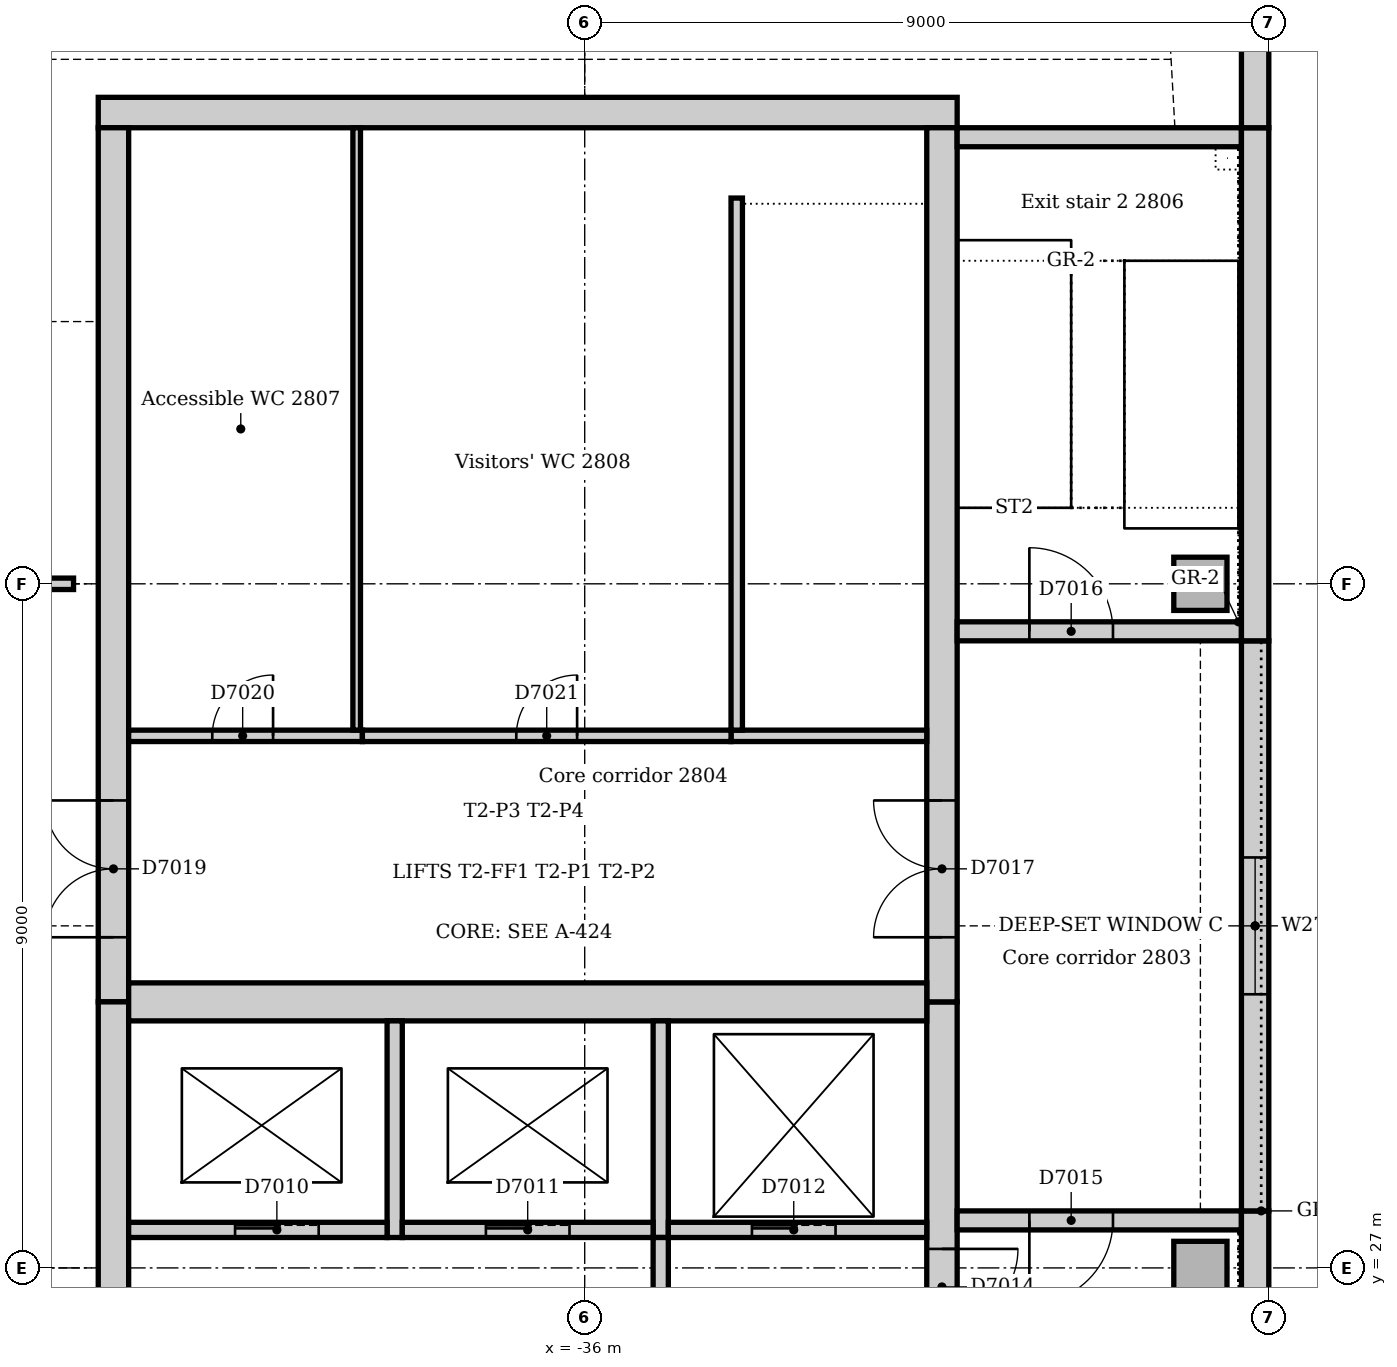
"""IFC4 building model, lengths in metres.
Left out: names, types, materials, properties, quantities, classifications, styles, units other than length and angle.
Written with IfcOpenShell. Run it as: python <this file> out.ifc"""

import sys

from ifc_helpers import new_model, si_unit, direction, frame, frame_2d, origin, origin_2d, place, context, subcontext, project, spatial, rectangle, extrude, element, fill, save


model = new_model("IFC4")
c1 = context("Model", 3, precision=1e-05, world=origin(), true_north=direction((0.0, 1.0)))
c2 = subcontext(c1, "Body", "Model", "MODEL_VIEW")
j1 = project(units=[si_unit("LENGTHUNIT", "METRE"), si_unit("PLANEANGLEUNIT", "RADIAN")], contexts=[c1])
p1 = place(None, origin())
s1 = spatial("IfcSite", under=j1, at=p1, CompositionType="ELEMENT")
p2 = place(p1, origin())
s2 = spatial("IfcBuilding", under=s1, at=p2, CompositionType="ELEMENT")
p3 = place(p2, frame((0.0, 0.0, 120.0)))
s3 = spatial("IfcBuildingStorey", under=s2, at=p3, CompositionType="ELEMENT", Elevation=120.0)
p4 = place(p3, frame((-31.1, 42.2, 0.0), z_axis=(0.0, 0.0, 1.0), x_axis=(-1.0, 0.0, 0.0)))
e1 = element("IfcWall", 1, at=p4, inside=s3, PredefinedType="SOLIDWALL", context=c2, shape_type="SweptSolid", body=[
    extrude(rectangle(XDim=11.3, YDim=0.4, at=frame_2d((5.65, 0.0))), origin(), (0.0, 0.0, 1.0), 4.0),
])
p5 = place(p3, frame((-31.3, 21.0, 0.0), z_axis=(0.0, 0.0, 1.0), x_axis=(0.0, 1.0, 0.0)))
e2 = element("IfcWall", 2, at=p5, inside=s3, PredefinedType="SOLIDWALL", context=c2, shape_type="SweptSolid", body=[
    extrude(rectangle(XDim=9.5, YDim=0.4, at=frame_2d((4.75, 0.0))), origin(), (0.0, 0.0, 1.0), 4.0),
])
p6 = place(p5, frame((5.25, 0.0, 0.0)))
e3 = element("IfcOpeningElement", 3, at=p6, cuts=e2, PredefinedType="OPENING", context=c2, shape_type="SweptSolid", body=[
    extrude(rectangle(XDim=1.0, YDim=2.1, at=frame_2d((0.5, 1.05))), frame((0.0, 0.21, 0.0), z_axis=(0.0, -1.0, 0.0), x_axis=(1.0, 0.0, 0.0)), (0.0, 0.0, 1.0), 0.42),
])
p7 = place(p3, frame((-31.3, 30.5, 0.0), z_axis=(0.0, 0.0, 1.0), x_axis=(0.0, 1.0, 0.0)))
e4 = element("IfcWall", 4, at=p7, inside=s3, PredefinedType="SOLIDWALL", context=c2, shape_type="SweptSolid", body=[
    extrude(rectangle(XDim=11.5, YDim=0.4, at=frame_2d((5.75, 0.0))), origin(), (0.0, 0.0, 1.0), 4.0),
])
p8 = place(p7, frame((0.85, 0.0, 0.0)))
e5 = element("IfcOpeningElement", 5, at=p8, cuts=e4, PredefinedType="OPENING", context=c2, shape_type="SweptSolid", body=[
    extrude(rectangle(XDim=1.8, YDim=2.1, at=frame_2d((0.9, 1.05))), frame((0.0, 0.21, 0.0), z_axis=(0.0, -1.0, 0.0), x_axis=(1.0, 0.0, 0.0)), (0.0, 0.0, 1.0), 0.42),
])
p9 = place(p3, frame((-42.2, 42.0, 0.0), z_axis=(0.0, 0.0, 1.0), x_axis=(0.0, -1.0, 0.0)))
e6 = element("IfcWall", 6, at=p9, inside=s3, PredefinedType="SOLIDWALL", context=c2, shape_type="SweptSolid", body=[
    extrude(rectangle(XDim=11.5, YDim=0.4, at=frame_2d((5.75, 0.0))), origin(), (0.0, 0.0, 1.0), 4.0),
])
p10 = place(p9, frame((8.85, 0.0, 0.0)))
e7 = element("IfcOpeningElement", 7, at=p10, cuts=e6, PredefinedType="OPENING", context=c2, shape_type="SweptSolid", body=[
    extrude(rectangle(XDim=1.8, YDim=2.1, at=frame_2d((0.9, 1.05))), frame((0.0, 0.21, 0.0), z_axis=(0.0, -1.0, 0.0), x_axis=(1.0, 0.0, 0.0)), (0.0, 0.0, 1.0), 0.42),
])
p11 = place(p3, frame((-42.2, 30.5, 0.0), z_axis=(0.0, 0.0, 1.0), x_axis=(0.0, -1.0, 0.0)))
e8 = element("IfcWall", 8, at=p11, inside=s3, PredefinedType="SOLIDWALL", context=c2, shape_type="SweptSolid", body=[
    extrude(rectangle(XDim=9.5, YDim=0.4, at=frame_2d((4.75, 0.0))), origin(), (0.0, 0.0, 1.0), 4.0),
])
p12 = place(p11, frame((3.85, 0.0, 0.0)))
e9 = element("IfcOpeningElement", 9, at=p12, cuts=e8, PredefinedType="OPENING", context=c2, shape_type="SweptSolid", body=[
    extrude(rectangle(XDim=1.8, YDim=2.1, at=frame_2d((0.9, 1.05))), frame((0.0, 0.21, 0.0), z_axis=(0.0, -1.0, 0.0), x_axis=(1.0, 0.0, 0.0)), (0.0, 0.0, 1.0), 0.42),
])
p13 = place(p3, frame((-42.0, 30.5, 0.0), z_axis=(0.0, 0.0, 1.0), x_axis=(1.0, 0.0, 0.0)))
e10 = element("IfcWall", 10, at=p13, inside=s3, PredefinedType="SOLIDWALL", context=c2, shape_type="SweptSolid", body=[
    extrude(rectangle(XDim=10.5, YDim=0.5, at=frame_2d((5.25, 0.0))), origin(), (0.0, 0.0, 1.0), 4.0),
])
p14 = place(p3, frame((-27.36, 27.625, 0.0), z_axis=(0.0, 0.0, 1.0), x_axis=(-1.0, 0.0, 0.0)))
e11 = element("IfcWall", 11, at=p14, inside=s3, PredefinedType="SOLIDWALL", context=c2, shape_type="SweptSolid", body=[
    extrude(rectangle(XDim=3.74, YDim=0.25, at=frame_2d((1.87, 0.0))), origin(), (0.0, 0.0, 1.0), 4.0),
])
p15 = place(p14, frame((1.69, 0.0, 0.0)))
e12 = element("IfcOpeningElement", 12, at=p15, cuts=e11, PredefinedType="OPENING", context=c2, shape_type="SweptSolid", body=[
    extrude(rectangle(XDim=1.1, YDim=2.1, at=frame_2d((0.55, 1.05))), frame((0.0, 0.135, 0.0), z_axis=(0.0, -1.0, 0.0), x_axis=(1.0, 0.0, 0.0)), (0.0, 0.0, 1.0), 0.27),
])
p16 = place(p3, frame((-31.1, 35.375, 0.0), z_axis=(0.0, 0.0, 1.0), x_axis=(1.0, 0.0, 0.0)))
e13 = element("IfcWall", 13, at=p16, inside=s3, PredefinedType="SOLIDWALL", context=c2, shape_type="SweptSolid", body=[
    extrude(rectangle(XDim=3.74, YDim=0.25, at=frame_2d((1.87, 0.0))), origin(), (0.0, 0.0, 1.0), 4.0),
])
p17 = place(p16, frame((0.95, 0.0, 0.0)))
e14 = element("IfcOpeningElement", 14, at=p17, cuts=e13, PredefinedType="OPENING", context=c2, shape_type="SweptSolid", body=[
    extrude(rectangle(XDim=1.1, YDim=2.1, at=frame_2d((0.55, 1.05))), frame((0.0, 0.135, 0.0), z_axis=(0.0, -1.0, 0.0), x_axis=(1.0, 0.0, 0.0)), (0.0, 0.0, 1.0), 0.27),
])
p18 = place(p3, frame((-27.36, 41.875, 0.0), z_axis=(0.0, 0.0, 1.0), x_axis=(-1.0, 0.0, 0.0)))
e15 = element("IfcWall", 15, at=p18, inside=s3, PredefinedType="SOLIDWALL", context=c2, shape_type="SweptSolid", body=[
    extrude(rectangle(XDim=3.74, YDim=0.25, at=frame_2d((1.87, 0.0))), origin(), (0.0, 0.0, 1.0), 4.0),
])
for number, where, z_axis, x_axis in (
    (16, (-27.9, 27.0, 0.0), (0.0, 0.0, 1.0), (1.0, 0.0, 0.0)),
    (17, (-27.9, 36.0, 0.0), (0.0, 0.0, 1.0), (1.0, 0.0, 0.0)),
):
    element("IfcColumn", number, at=place(p3, frame(where, z_axis=z_axis, x_axis=x_axis)), inside=s3, PredefinedType="COLUMN", context=c2, shape_type="SweptSolid", body=[
        extrude(rectangle(XDim=0.7, YDim=0.7, at=origin_2d()), origin(), (0.0, 0.0, 1.0), 4.0),
    ])
p19 = place(p3, frame((-27.18, 21.0, 0.0), z_axis=(0.0, 0.0, 1.0), x_axis=(0.0, 1.0, 0.0)))
e18 = element("IfcWall", 18, at=p19, inside=s3, PredefinedType="STANDARD", context=c2, shape_type="SweptSolid", body=[
    extrude(rectangle(XDim=6.75, YDim=0.36, at=frame_2d((3.375, 0.0))), origin(), (0.0, 0.0, 1.0), 3.85),
])
p20 = place(p3, frame((-27.18, 27.75, 0.0), z_axis=(0.0, 0.0, 1.0), x_axis=(0.0, 1.0, 0.0)))
e19 = element("IfcWall", 19, at=p20, inside=s3, PredefinedType="STANDARD", context=c2, shape_type="SweptSolid", body=[
    extrude(rectangle(XDim=7.5, YDim=0.36, at=frame_2d((3.75, 0.0))), origin(), (0.0, 0.0, 1.0), 3.85),
])
p21 = place(p20, frame((2.85, 0.0, 1.2)))
e20 = element("IfcOpeningElement", 20, at=p21, cuts=e19, PredefinedType="OPENING", context=c2, shape_type="SweptSolid", body=[
    extrude(rectangle(XDim=1.8, YDim=1.2, at=frame_2d((0.9, 0.6))), frame((0.0, 0.19, 0.0), z_axis=(0.0, -1.0, 0.0), x_axis=(1.0, 0.0, 0.0)), (0.0, 0.0, 1.0), 0.38),
])
p22 = place(p3, frame((-27.18, 35.25, 0.0), z_axis=(0.0, 0.0, 1.0), x_axis=(0.0, 1.0, 0.0)))
e21 = element("IfcWall", 21, at=p22, inside=s3, PredefinedType="STANDARD", context=c2, shape_type="SweptSolid", body=[
    extrude(rectangle(XDim=6.75, YDim=0.36, at=frame_2d((3.375, 0.0))), origin(), (0.0, 0.0, 1.0), 3.85),
])
p23 = place(p3, frame((-27.18, 42.0, 0.0), z_axis=(0.0, 0.0, 1.0), x_axis=(0.0, 1.0, 0.0)))
e22 = element("IfcWall", 22, at=p23, inside=s3, PredefinedType="STANDARD", context=c2, shape_type="SweptSolid", body=[
    extrude(rectangle(XDim=3.257, YDim=0.36, at=frame_2d((1.629, 0.0))), origin(), (0.0, 0.0, 1.0), 3.85),
])
p24 = place(p3, frame((-38.5, 27.4, 0.0), z_axis=(0.0, 0.0, 1.0), x_axis=(0.0, 1.0, 0.0)))
e23 = element("IfcWall", 23, at=p24, inside=s3, PredefinedType="SOLIDWALL", context=c2, shape_type="SweptSolid", body=[
    extrude(rectangle(XDim=2.85, YDim=0.2, at=frame_2d((1.425, 0.0))), origin(), (0.0, 0.0, 1.0), 4.0),
])
p25 = place(p3, frame((-42.0, 27.5, 0.0), z_axis=(0.0, 0.0, 1.0), x_axis=(1.0, 0.0, 0.0)))
e24 = element("IfcWall", 24, at=p25, inside=s3, PredefinedType="SOLIDWALL", context=c2, shape_type="SweptSolid", body=[
    extrude(rectangle(XDim=3.4, YDim=0.2, at=frame_2d((1.7, 0.0))), origin(), (0.0, 0.0, 1.0), 4.0),
])
p26 = place(p25, frame((1.4, 0.0, 0.0)))
e25 = element("IfcOpeningElement", 25, at=p26, cuts=e24, PredefinedType="OPENING", context=c2, shape_type="SweptSolid", body=[
    extrude(rectangle(XDim=1.1, YDim=2.1, at=frame_2d((0.55, 1.05))), frame((0.0, 0.11, 0.0), z_axis=(0.0, -1.0, 0.0), x_axis=(1.0, 0.0, 0.0)), (0.0, 0.0, 1.0), 0.22),
])
p27 = place(p3, frame((-35.0, 27.4, 0.0), z_axis=(0.0, 0.0, 1.0), x_axis=(0.0, 1.0, 0.0)))
e26 = element("IfcWall", 26, at=p27, inside=s3, PredefinedType="SOLIDWALL", context=c2, shape_type="SweptSolid", body=[
    extrude(rectangle(XDim=2.85, YDim=0.2, at=frame_2d((1.425, 0.0))), origin(), (0.0, 0.0, 1.0), 4.0),
])
p28 = place(p3, frame((-38.4, 27.5, 0.0), z_axis=(0.0, 0.0, 1.0), x_axis=(1.0, 0.0, 0.0)))
e27 = element("IfcWall", 27, at=p28, inside=s3, PredefinedType="SOLIDWALL", context=c2, shape_type="SweptSolid", body=[
    extrude(rectangle(XDim=3.3, YDim=0.2, at=frame_2d((1.65, 0.0))), origin(), (0.0, 0.0, 1.0), 4.0),
])
p29 = place(p28, frame((1.1, 0.0, 0.0)))
e28 = element("IfcOpeningElement", 28, at=p29, cuts=e27, PredefinedType="OPENING", context=c2, shape_type="SweptSolid", body=[
    extrude(rectangle(XDim=1.1, YDim=2.1, at=frame_2d((0.55, 1.05))), frame((0.0, 0.11, 0.0), z_axis=(0.0, -1.0, 0.0), x_axis=(1.0, 0.0, 0.0)), (0.0, 0.0, 1.0), 0.22),
])
p30 = place(p3, frame((-34.9, 27.5, 0.0), z_axis=(0.0, 0.0, 1.0), x_axis=(1.0, 0.0, 0.0)))
e29 = element("IfcWall", 29, at=p30, inside=s3, PredefinedType="SOLIDWALL", context=c2, shape_type="SweptSolid", body=[
    extrude(rectangle(XDim=3.4, YDim=0.2, at=frame_2d((1.7, 0.0))), origin(), (0.0, 0.0, 1.0), 4.0),
])
p31 = place(p30, frame((1.1, 0.0, 0.0)))
e30 = element("IfcOpeningElement", 30, at=p31, cuts=e29, PredefinedType="OPENING", context=c2, shape_type="SweptSolid", body=[
    extrude(rectangle(XDim=1.1, YDim=2.1, at=frame_2d((0.55, 1.05))), frame((0.0, 0.11, 0.0), z_axis=(0.0, -1.0, 0.0), x_axis=(1.0, 0.0, 0.0)), (0.0, 0.0, 1.0), 0.22),
])
p32 = place(p3, frame((-35.0, 24.1, 0.0), z_axis=(0.0, 0.0, 1.0), x_axis=(0.0, 1.0, 0.0)))
e31 = element("IfcWall", 31, at=p32, inside=s3, PredefinedType="SOLIDWALL", context=c2, shape_type="SweptSolid", body=[
    extrude(rectangle(XDim=3.3, YDim=0.2, at=frame_2d((1.65, 0.0))), origin(), (0.0, 0.0, 1.0), 4.0),
])
p33 = place(p32, frame((1.15, 0.0, 0.0)))
e32 = element("IfcOpeningElement", 32, at=p33, cuts=e31, PredefinedType="OPENING", context=c2, shape_type="SweptSolid", body=[
    extrude(rectangle(XDim=1.0, YDim=2.1, at=frame_2d((0.5, 1.05))), frame((0.0, 0.11, 0.0), z_axis=(0.0, -1.0, 0.0), x_axis=(1.0, 0.0, 0.0)), (0.0, 0.0, 1.0), 0.22),
])
p34 = place(p3, frame((-34.075, 34.0, 0.0), z_axis=(0.0, 0.0, 1.0), x_axis=(1.0, 0.0, 0.0)))
e33 = element("IfcWall", 33, at=p34, inside=s3, PredefinedType="SOLIDWALL", context=c2, shape_type="SweptSolid", body=[
    extrude(rectangle(XDim=2.575, YDim=0.15, at=frame_2d((1.288, 0.0))), origin(), (0.0, 0.0, 1.0), 4.0),
])
p35 = place(p3, frame((-34.0, 41.075, 0.0), z_axis=(0.0, 0.0, 1.0), x_axis=(0.0, -1.0, 0.0)))
e34 = element("IfcWall", 34, at=p35, inside=s3, PredefinedType="SOLIDWALL", context=c2, shape_type="SweptSolid", body=[
    extrude(rectangle(XDim=7.0, YDim=0.15, at=frame_2d((3.5, 0.0))), origin(), (0.0, 0.0, 1.0), 4.0),
])
p36 = place(p3, frame((-38.925, 34.0, 0.0), z_axis=(0.0, 0.0, 1.0), x_axis=(-1.0, 0.0, 0.0)))
e35 = element("IfcWall", 35, at=p36, inside=s3, PredefinedType="PARTITIONING", context=c2, shape_type="SweptSolid", body=[
    extrude(rectangle(XDim=3.075, YDim=0.15, at=frame_2d((1.538, 0.0))), origin(), (0.0, 0.0, 1.0), 3.85),
])
p37 = place(p36, frame((1.175, 0.0, 0.0)))
e36 = element("IfcOpeningElement", 36, at=p37, cuts=e35, PredefinedType="OPENING", context=c2, shape_type="SweptSolid", body=[
    extrude(rectangle(XDim=0.8, YDim=2.1, at=frame_2d((0.4, 1.05))), frame((0.0, 0.085, 0.0), z_axis=(0.0, -1.0, 0.0), x_axis=(1.0, 0.0, 0.0)), (0.0, 0.0, 1.0), 0.17),
])
p38 = place(p3, frame((-34.075, 34.0, 0.0), z_axis=(0.0, 0.0, 1.0), x_axis=(-1.0, 0.0, 0.0)))
e37 = element("IfcWall", 37, at=p38, inside=s3, PredefinedType="PARTITIONING", context=c2, shape_type="SweptSolid", body=[
    extrude(rectangle(XDim=4.85, YDim=0.15, at=frame_2d((2.425, 0.0))), origin(), (0.0, 0.0, 1.0), 3.85),
])
p39 = place(p38, frame((2.025, 0.0, 0.0)))
e38 = element("IfcOpeningElement", 38, at=p39, cuts=e37, PredefinedType="OPENING", context=c2, shape_type="SweptSolid", body=[
    extrude(rectangle(XDim=0.8, YDim=2.1, at=frame_2d((0.4, 1.05))), frame((0.0, 0.085, 0.0), z_axis=(0.0, -1.0, 0.0), x_axis=(1.0, 0.0, 0.0)), (0.0, 0.0, 1.0), 0.17),
])
p40 = place(p3, frame((-39.0, 34.075, 0.0), z_axis=(0.0, 0.0, 1.0), x_axis=(0.0, 1.0, 0.0)))
e39 = element("IfcWall", 39, at=p40, inside=s3, PredefinedType="PARTITIONING", context=c2, shape_type="SweptSolid", body=[
    extrude(rectangle(XDim=7.925, YDim=0.1, at=frame_2d((3.962, 0.0))), origin(), (0.0, 0.0, 1.0), 3.85),
])
p41 = place(p3, frame((-44.7, 36.0, 0.0), z_axis=(0.0, 0.0, 1.0), x_axis=(1.0, 0.0, 0.0)))
e40 = element("IfcWall", 40, at=p41, inside=s3, PredefinedType="PARTITIONING", context=c2, shape_type="SweptSolid", body=[
    extrude(rectangle(XDim=1.975, YDim=0.15, at=frame_2d((0.988, 0.0))), origin(), (0.0, 0.0, 1.0), 3.602),
])
p42 = place(p41, frame((0.55, 0.0, 0.0)))
e41 = element("IfcOpeningElement", 41, at=p42, cuts=e40, PredefinedType="OPENING", context=c2, shape_type="SweptSolid", body=[
    extrude(rectangle(XDim=0.9, YDim=2.1, at=frame_2d((0.45, 1.05))), frame((0.0, 0.085, 0.0), z_axis=(0.0, -1.0, 0.0), x_axis=(1.0, 0.0, 0.0)), (0.0, 0.0, 1.0), 0.17),
])
p43 = place(p21, origin())
e42 = element("IfcWindow", 42, at=p43, inside=s3, PartitioningType="SINGLE_PANEL", PredefinedType="WINDOW", context=c2, shape_type="SweptSolid", body=[
    extrude(rectangle(XDim=1.8, YDim=1.2, at=frame_2d((0.9, 0.6))), frame((0.0, 0.13, 0.0), z_axis=(0.0, -1.0, 0.0), x_axis=(1.0, 0.0, 0.0)), (0.0, 0.0, 1.0), 0.06),
])
fill(e20, e42)
p44 = place(p26, origin())
e43 = element("IfcDoor", 43, at=p44, inside=s3, OperationType="SLIDING_TO_LEFT", PredefinedType="DOOR", context=c2, shape_type="SweptSolid", body=[
    extrude(rectangle(XDim=1.1, YDim=2.1, at=frame_2d((0.55, 1.05))), frame((0.0, 0.025, 0.0), z_axis=(0.0, -1.0, 0.0), x_axis=(1.0, 0.0, 0.0)), (0.0, 0.0, 1.0), 0.05),
])
fill(e25, e43)
p45 = place(p29, origin())
e44 = element("IfcDoor", 44, at=p45, inside=s3, OperationType="SLIDING_TO_LEFT", PredefinedType="DOOR", context=c2, shape_type="SweptSolid", body=[
    extrude(rectangle(XDim=1.1, YDim=2.1, at=frame_2d((0.55, 1.05))), frame((0.0, 0.025, 0.0), z_axis=(0.0, -1.0, 0.0), x_axis=(1.0, 0.0, 0.0)), (0.0, 0.0, 1.0), 0.05),
])
fill(e28, e44)
p46 = place(p31, origin())
e45 = element("IfcDoor", 45, at=p46, inside=s3, OperationType="SLIDING_TO_LEFT", PredefinedType="DOOR", context=c2, shape_type="SweptSolid", body=[
    extrude(rectangle(XDim=1.1, YDim=2.1, at=frame_2d((0.55, 1.05))), frame((0.0, 0.025, 0.0), z_axis=(0.0, -1.0, 0.0), x_axis=(1.0, 0.0, 0.0)), (0.0, 0.0, 1.0), 0.05),
])
fill(e30, e45)
p47 = place(p6, frame((1.0, 0.0, 0.0), z_axis=(0.0, 0.0, 1.0), x_axis=(-1.0, 0.0, 0.0)))
e46 = element("IfcDoor", 46, at=p47, inside=s3, OperationType="SINGLE_SWING_LEFT", PredefinedType="DOOR", context=c2, shape_type="SweptSolid", body=[
    extrude(rectangle(XDim=1.0, YDim=2.1, at=frame_2d((0.5, 1.05))), frame((0.0, 0.025, 0.0), z_axis=(0.0, -1.0, 0.0), x_axis=(1.0, 0.0, 0.0)), (0.0, 0.0, 1.0), 0.05),
])
fill(e3, e46)
p48 = place(p15, origin())
e47 = element("IfcDoor", 47, at=p48, inside=s3, OperationType="SINGLE_SWING_RIGHT", PredefinedType="DOOR", context=c2, shape_type="SweptSolid", body=[
    extrude(rectangle(XDim=1.1, YDim=2.1, at=frame_2d((0.55, 1.05))), frame((0.0, 0.025, 0.0), z_axis=(0.0, -1.0, 0.0), x_axis=(1.0, 0.0, 0.0)), (0.0, 0.0, 1.0), 0.05),
])
fill(e12, e47)
p49 = place(p17, origin())
e48 = element("IfcDoor", 48, at=p49, inside=s3, OperationType="SINGLE_SWING_LEFT", PredefinedType="DOOR", context=c2, shape_type="SweptSolid", body=[
    extrude(rectangle(XDim=1.1, YDim=2.1, at=frame_2d((0.55, 1.05))), frame((0.0, 0.025, 0.0), z_axis=(0.0, -1.0, 0.0), x_axis=(1.0, 0.0, 0.0)), (0.0, 0.0, 1.0), 0.05),
])
fill(e14, e48)
p50 = place(p8, origin())
e49 = element("IfcDoor", 49, at=p50, inside=s3, OperationType="DOUBLE_DOOR_SINGLE_SWING", PredefinedType="DOOR", context=c2, shape_type="SweptSolid", body=[
    extrude(rectangle(XDim=1.8, YDim=2.1, at=frame_2d((0.9, 1.05))), frame((0.0, 0.025, 0.0), z_axis=(0.0, -1.0, 0.0), x_axis=(1.0, 0.0, 0.0)), (0.0, 0.0, 1.0), 0.05),
])
fill(e5, e49)
p51 = place(p10, frame((1.8, 0.0, 0.0), z_axis=(0.0, 0.0, 1.0), x_axis=(-1.0, 0.0, 0.0)))
e50 = element("IfcDoor", 50, at=p51, inside=s3, OperationType="DOUBLE_DOOR_SINGLE_SWING", PredefinedType="DOOR", context=c2, shape_type="SweptSolid", body=[
    extrude(rectangle(XDim=1.8, YDim=2.1, at=frame_2d((0.9, 1.05))), frame((0.0, 0.025, 0.0), z_axis=(0.0, -1.0, 0.0), x_axis=(1.0, 0.0, 0.0)), (0.0, 0.0, 1.0), 0.05),
])
fill(e7, e50)
p52 = place(p37, frame((0.8, 0.0, 0.0), z_axis=(0.0, 0.0, 1.0), x_axis=(-1.0, 0.0, 0.0)))
e51 = element("IfcDoor", 51, at=p52, inside=s3, OperationType="SINGLE_SWING_RIGHT", PredefinedType="DOOR", context=c2, shape_type="SweptSolid", body=[
    extrude(rectangle(XDim=0.8, YDim=2.1, at=frame_2d((0.4, 1.05))), frame((0.0, 0.025, 0.0), z_axis=(0.0, -1.0, 0.0), x_axis=(1.0, 0.0, 0.0)), (0.0, 0.0, 1.0), 0.05),
])
fill(e36, e51)
p53 = place(p39, frame((0.8, 0.0, 0.0), z_axis=(0.0, 0.0, 1.0), x_axis=(-1.0, 0.0, 0.0)))
e52 = element("IfcDoor", 52, at=p53, inside=s3, OperationType="SINGLE_SWING_RIGHT", PredefinedType="DOOR", context=c2, shape_type="SweptSolid", body=[
    extrude(rectangle(XDim=0.8, YDim=2.1, at=frame_2d((0.4, 1.05))), frame((0.0, 0.025, 0.0), z_axis=(0.0, -1.0, 0.0), x_axis=(1.0, 0.0, 0.0)), (0.0, 0.0, 1.0), 0.05),
])
fill(e38, e52)
save(model, sys.argv[1])
